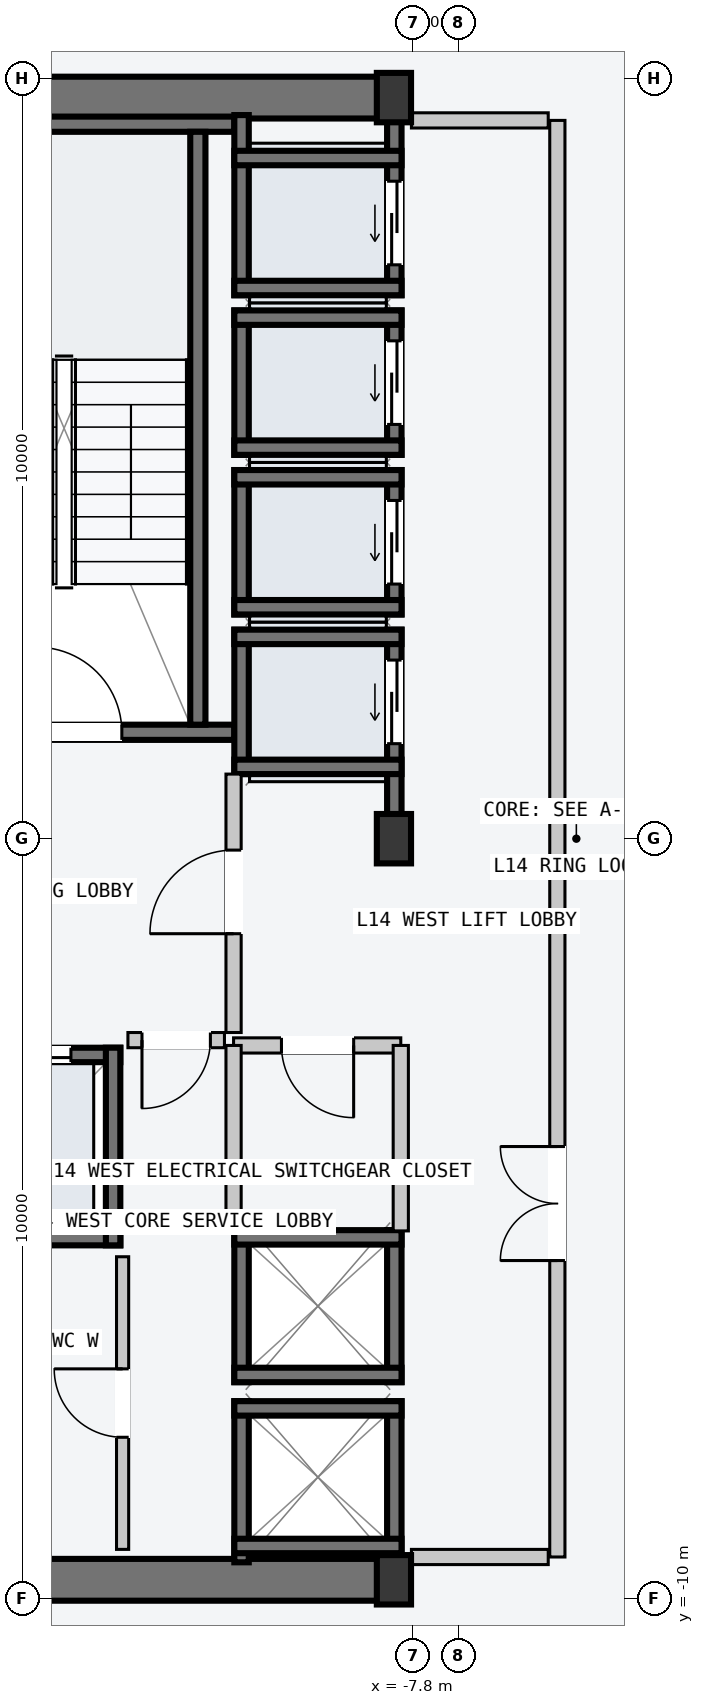
"""IFC4 building model, lengths in metres.
Left out: names, types, materials, properties, quantities, classifications, styles, units other than length and angle.
Written with IfcOpenShell. Run it as: python <this file> out.ifc"""

import sys

from ifc_helpers import new_model, si_unit, direction, frame, frame_2d, origin, origin_2d, place, context, subcontext, project, spatial, rectangle, i_section, extrude, element, fill, save


model = new_model("IFC4")
c1 = context("Model", 3, precision=1e-05, world=origin(), true_north=direction((0.0, 1.0)))
c2 = subcontext(c1, "Body", "Model", "MODEL_VIEW")
j1 = project(units=[si_unit("LENGTHUNIT", "METRE"), si_unit("PLANEANGLEUNIT", "RADIAN")], contexts=[c1])
p1 = place(None, origin())
s1 = spatial("IfcSite", under=j1, at=p1, CompositionType="ELEMENT")
p2 = place(p1, origin())
s2 = spatial("IfcBuilding", under=s1, at=p2, CompositionType="ELEMENT")
p3 = place(p2, frame((0.0, 0.0, 56.4)))
s3 = spatial("IfcBuildingStorey", under=s2, at=p3, CompositionType="ELEMENT", Elevation=56.4)
for number, where, z_axis, x_axis in (
    (1, (-14.53, -9.75, -0.2), (0.0, 0.0, 1.0), (1.0, 0.0, 0.0)),
    (2, (-14.53, 9.75, -0.2), (0.0, 0.0, 1.0), (1.0, 0.0, 0.0)),
):
    element("IfcWall", number, at=place(p3, frame(where, z_axis=z_axis, x_axis=x_axis)), inside=s3, PredefinedType="SHEAR", context=c2, shape_type="SweptSolid", body=[
        extrude(rectangle(XDim=6.46, YDim=0.55, at=frame_2d((3.23, 0.0))), origin(), (0.0, 0.0, 1.0), 3.6),
    ])
p4 = place(p3, frame((-14.25, 1.4, -0.2), z_axis=(0.0, 0.0, 1.0), x_axis=(1.0, 0.0, 0.0)))
e3 = element("IfcWall", 3, at=p4, inside=s3, PredefinedType="SOLIDWALL", context=c2, shape_type="SweptSolid", body=[
    extrude(rectangle(XDim=4.1, YDim=0.2, at=frame_2d((2.05, 0.0))), origin(), (0.0, 0.0, 1.0), 3.6),
])
p5 = place(p4, frame((1.5, 0.0, 0.2)))
e4 = element("IfcOpeningElement", 4, at=p5, cuts=e3, PredefinedType="OPENING", context=c2, shape_type="SweptSolid", body=[
    extrude(rectangle(XDim=1.12, YDim=2.18, at=frame_2d((0.56, 1.09))), frame((0.0, 0.11, 0.0), z_axis=(0.0, -1.0, 0.0), x_axis=(1.0, 0.0, 0.0)), (0.0, 0.0, 1.0), 0.22),
])
p6 = place(p3, frame((-14.25, 9.4, -0.2), z_axis=(0.0, 0.0, 1.0), x_axis=(1.0, 0.0, 0.0)))
e5 = element("IfcWall", 5, at=p6, inside=s3, PredefinedType="SOLIDWALL", context=c2, shape_type="SweptSolid", body=[
    extrude(rectangle(XDim=4.1, YDim=0.2, at=frame_2d((2.05, 0.0))), origin(), (0.0, 0.0, 1.0), 3.6),
])
p7 = place(p3, frame((-10.63, 1.5, -0.2), z_axis=(0.0, 0.0, 1.0), x_axis=(0.0, 1.0, 0.0)))
e6 = element("IfcWall", 6, at=p7, inside=s3, PredefinedType="SOLIDWALL", context=c2, shape_type="SweptSolid", body=[
    extrude(rectangle(XDim=7.8, YDim=0.2, at=frame_2d((3.9, 0.0))), origin(), (0.0, 0.0, 1.0), 3.6),
])
for number, where, z_axis, x_axis in (
    (7, (-8.05, -9.75, 0.0), (0.0, 0.0, 1.0), (1.0, 0.0, 0.0)),
    (8, (-8.05, 0.0, 0.0), (0.0, 0.0, 1.0), (1.0, 0.0, 0.0)),
    (9, (-8.05, 9.75, 0.0), (0.0, 0.0, 1.0), (1.0, 0.0, 0.0)),
):
    element("IfcColumn", number, at=place(p3, frame(where, z_axis=z_axis, x_axis=x_axis)), inside=s3, PredefinedType="COLUMN", context=c2, shape_type="SweptSolid", body=[
        extrude(i_section(OverallWidth=0.45, OverallDepth=0.65, WebThickness=0.025, FlangeThickness=0.04, at=origin_2d()), origin(), (0.0, 0.0, 1.0), 3.6),
    ])
p8 = place(p3, frame((-8.045, 0.21, -0.2), z_axis=(0.0, 0.0, 1.0), x_axis=(0.0, 1.0, 0.0)))
e10 = element("IfcWall", 10, at=p8, inside=s3, PredefinedType="SOLIDWALL", context=c2, shape_type="SweptSolid", body=[
    extrude(rectangle(XDim=2.54, YDim=0.19, at=frame_2d((1.27, 0.0))), origin(), (0.0, 0.0, 1.0), 3.6),
])
p9 = place(p8, frame((1.04, 0.0, 0.2)))
e11 = element("IfcOpeningElement", 11, at=p9, cuts=e10, PredefinedType="OPENING", context=c2, shape_type="SweptSolid", body=[
    extrude(rectangle(XDim=1.1, YDim=2.2, at=frame_2d((0.55, 1.1))), frame((0.0, 0.105, 0.0), z_axis=(0.0, -1.0, 0.0), x_axis=(1.0, 0.0, 0.0)), (0.0, 0.0, 1.0), 0.21),
])
p10 = place(p3, frame((-10.055, 0.85, -0.2), z_axis=(0.0, 0.0, 1.0), x_axis=(0.0, 1.0, 0.0)))
e12 = element("IfcWall", 12, at=p10, inside=s3, PredefinedType="SOLIDWALL", context=c2, shape_type="SweptSolid", body=[
    extrude(rectangle(XDim=1.9, YDim=0.19, at=frame_2d((0.95, 0.0))), origin(), (0.0, 0.0, 1.0), 3.6),
])
for number, where, z_axis, x_axis in (
    (13, (-10.15, 2.655, -0.2), (0.0, 0.0, 1.0), (1.0, 0.0, 0.0)),
    (14, (-10.15, 0.945, -0.2), (0.0, 0.0, 1.0), (1.0, 0.0, 0.0)),
):
    element("IfcWall", number, at=place(p3, frame(where, z_axis=z_axis, x_axis=x_axis)), inside=s3, PredefinedType="SOLIDWALL", context=c2, shape_type="SweptSolid", body=[
        extrude(rectangle(XDim=2.2, YDim=0.19, at=frame_2d((1.1, 0.0))), origin(), (0.0, 0.0, 1.0), 3.6),
    ])
p11 = place(p3, frame((-8.045, 2.95, -0.2), z_axis=(0.0, 0.0, 1.0), x_axis=(0.0, 1.0, 0.0)))
e15 = element("IfcWall", 15, at=p11, inside=s3, PredefinedType="SOLIDWALL", context=c2, shape_type="SweptSolid", body=[
    extrude(rectangle(XDim=1.9, YDim=0.19, at=frame_2d((0.95, 0.0))), origin(), (0.0, 0.0, 1.0), 3.6),
])
p12 = place(p11, frame((0.4, 0.0, 0.2)))
e16 = element("IfcOpeningElement", 16, at=p12, cuts=e15, PredefinedType="OPENING", context=c2, shape_type="SweptSolid", body=[
    extrude(rectangle(XDim=1.1, YDim=2.2, at=frame_2d((0.55, 1.1))), frame((0.0, 0.105, 0.0), z_axis=(0.0, -1.0, 0.0), x_axis=(1.0, 0.0, 0.0)), (0.0, 0.0, 1.0), 0.21),
])
p13 = place(p3, frame((-10.055, 2.95, -0.2), z_axis=(0.0, 0.0, 1.0), x_axis=(0.0, 1.0, 0.0)))
e17 = element("IfcWall", 17, at=p13, inside=s3, PredefinedType="SOLIDWALL", context=c2, shape_type="SweptSolid", body=[
    extrude(rectangle(XDim=1.9, YDim=0.19, at=frame_2d((0.95, 0.0))), origin(), (0.0, 0.0, 1.0), 3.6),
])
for number, where, z_axis, x_axis in (
    (18, (-10.15, 4.755, -0.2), (0.0, 0.0, 1.0), (1.0, 0.0, 0.0)),
    (19, (-10.15, 3.045, -0.2), (0.0, 0.0, 1.0), (1.0, 0.0, 0.0)),
):
    element("IfcWall", number, at=place(p3, frame(where, z_axis=z_axis, x_axis=x_axis)), inside=s3, PredefinedType="SOLIDWALL", context=c2, shape_type="SweptSolid", body=[
        extrude(rectangle(XDim=2.2, YDim=0.19, at=frame_2d((1.1, 0.0))), origin(), (0.0, 0.0, 1.0), 3.6),
    ])
p14 = place(p3, frame((-8.045, 5.05, -0.2), z_axis=(0.0, 0.0, 1.0), x_axis=(0.0, 1.0, 0.0)))
e20 = element("IfcWall", 20, at=p14, inside=s3, PredefinedType="SOLIDWALL", context=c2, shape_type="SweptSolid", body=[
    extrude(rectangle(XDim=1.9, YDim=0.19, at=frame_2d((0.95, 0.0))), origin(), (0.0, 0.0, 1.0), 3.6),
])
p15 = place(p14, frame((0.4, 0.0, 0.2)))
e21 = element("IfcOpeningElement", 21, at=p15, cuts=e20, PredefinedType="OPENING", context=c2, shape_type="SweptSolid", body=[
    extrude(rectangle(XDim=1.1, YDim=2.2, at=frame_2d((0.55, 1.1))), frame((0.0, 0.105, 0.0), z_axis=(0.0, -1.0, 0.0), x_axis=(1.0, 0.0, 0.0)), (0.0, 0.0, 1.0), 0.21),
])
p16 = place(p3, frame((-10.055, 5.05, -0.2), z_axis=(0.0, 0.0, 1.0), x_axis=(0.0, 1.0, 0.0)))
e22 = element("IfcWall", 22, at=p16, inside=s3, PredefinedType="SOLIDWALL", context=c2, shape_type="SweptSolid", body=[
    extrude(rectangle(XDim=1.9, YDim=0.19, at=frame_2d((0.95, 0.0))), origin(), (0.0, 0.0, 1.0), 3.6),
])
for number, where, z_axis, x_axis in (
    (23, (-10.15, 6.855, -0.2), (0.0, 0.0, 1.0), (1.0, 0.0, 0.0)),
    (24, (-10.15, 5.145, -0.2), (0.0, 0.0, 1.0), (1.0, 0.0, 0.0)),
):
    element("IfcWall", number, at=place(p3, frame(where, z_axis=z_axis, x_axis=x_axis)), inside=s3, PredefinedType="SOLIDWALL", context=c2, shape_type="SweptSolid", body=[
        extrude(rectangle(XDim=2.2, YDim=0.19, at=frame_2d((1.1, 0.0))), origin(), (0.0, 0.0, 1.0), 3.6),
    ])
p17 = place(p3, frame((-8.045, 7.15, -0.2), z_axis=(0.0, 0.0, 1.0), x_axis=(0.0, 1.0, 0.0)))
e25 = element("IfcWall", 25, at=p17, inside=s3, PredefinedType="SOLIDWALL", context=c2, shape_type="SweptSolid", body=[
    extrude(rectangle(XDim=2.37, YDim=0.19, at=frame_2d((1.185, 0.0))), origin(), (0.0, 0.0, 1.0), 3.6),
])
p18 = place(p17, frame((0.4, 0.0, 0.2)))
e26 = element("IfcOpeningElement", 26, at=p18, cuts=e25, PredefinedType="OPENING", context=c2, shape_type="SweptSolid", body=[
    extrude(rectangle(XDim=1.1, YDim=2.2, at=frame_2d((0.55, 1.1))), frame((0.0, 0.105, 0.0), z_axis=(0.0, -1.0, 0.0), x_axis=(1.0, 0.0, 0.0)), (0.0, 0.0, 1.0), 0.21),
])
p19 = place(p3, frame((-10.055, 7.15, -0.2), z_axis=(0.0, 0.0, 1.0), x_axis=(0.0, 1.0, 0.0)))
e27 = element("IfcWall", 27, at=p19, inside=s3, PredefinedType="SOLIDWALL", context=c2, shape_type="SweptSolid", body=[
    extrude(rectangle(XDim=2.37, YDim=0.19, at=frame_2d((1.185, 0.0))), origin(), (0.0, 0.0, 1.0), 3.6),
])
for number, where, z_axis, x_axis in (
    (28, (-10.15, 8.955, -0.2), (0.0, 0.0, 1.0), (1.0, 0.0, 0.0)),
    (29, (-10.15, 7.245, -0.2), (0.0, 0.0, 1.0), (1.0, 0.0, 0.0)),
):
    element("IfcWall", number, at=place(p3, frame(where, z_axis=z_axis, x_axis=x_axis)), inside=s3, PredefinedType="SOLIDWALL", context=c2, shape_type="SweptSolid", body=[
        extrude(rectangle(XDim=2.2, YDim=0.19, at=frame_2d((1.1, 0.0))), origin(), (0.0, 0.0, 1.0), 3.6),
    ])
for number, where, z_axis, x_axis in (
    (30, (-8.045, -9.52, -0.2), (0.0, 0.0, 1.0), (0.0, 1.0, 0.0)),
    (31, (-10.055, -9.52, -0.2), (0.0, 0.0, 1.0), (0.0, 1.0, 0.0)),
):
    element("IfcWall", number, at=place(p3, frame(where, z_axis=z_axis, x_axis=x_axis)), inside=s3, PredefinedType="SOLIDWALL", context=c2, shape_type="SweptSolid", body=[
        extrude(rectangle(XDim=2.12, YDim=0.19, at=frame_2d((1.06, 0.0))), origin(), (0.0, 0.0, 1.0), 3.6),
    ])
for number, where, z_axis, x_axis in (
    (32, (-10.15, -7.495, -0.2), (0.0, 0.0, 1.0), (1.0, 0.0, 0.0)),
    (33, (-10.15, -9.305, -0.2), (0.0, 0.0, 1.0), (1.0, 0.0, 0.0)),
):
    element("IfcWall", number, at=place(p3, frame(where, z_axis=z_axis, x_axis=x_axis)), inside=s3, PredefinedType="SOLIDWALL", context=c2, shape_type="SweptSolid", body=[
        extrude(rectangle(XDim=2.2, YDim=0.19, at=frame_2d((1.1, 0.0))), origin(), (0.0, 0.0, 1.0), 3.6),
    ])
for number, where, z_axis, x_axis in (
    (34, (-8.045, -7.15, -0.2), (0.0, 0.0, 1.0), (0.0, 1.0, 0.0)),
    (35, (-10.055, -7.15, -0.2), (0.0, 0.0, 1.0), (0.0, 1.0, 0.0)),
):
    element("IfcWall", number, at=place(p3, frame(where, z_axis=z_axis, x_axis=x_axis)), inside=s3, PredefinedType="SOLIDWALL", context=c2, shape_type="SweptSolid", body=[
        extrude(rectangle(XDim=2.0, YDim=0.19, at=frame_2d((1.0, 0.0))), origin(), (0.0, 0.0, 1.0), 3.6),
    ])
for number, where, z_axis, x_axis in (
    (36, (-10.15, -5.245, -0.2), (0.0, 0.0, 1.0), (1.0, 0.0, 0.0)),
    (37, (-10.15, -7.055, -0.2), (0.0, 0.0, 1.0), (1.0, 0.0, 0.0)),
):
    element("IfcWall", number, at=place(p3, frame(where, z_axis=z_axis, x_axis=x_axis)), inside=s3, PredefinedType="SOLIDWALL", context=c2, shape_type="SweptSolid", body=[
        extrude(rectangle(XDim=2.2, YDim=0.19, at=frame_2d((1.1, 0.0))), origin(), (0.0, 0.0, 1.0), 3.6),
    ])
p20 = place(p3, frame((-14.33, -2.845, -0.2), z_axis=(0.0, 0.0, 1.0), x_axis=(1.0, 0.0, 0.0)))
e38 = element("IfcWall", 38, at=p20, inside=s3, PredefinedType="SOLIDWALL", context=c2, shape_type="SweptSolid", body=[
    extrude(rectangle(XDim=2.68, YDim=0.19, at=frame_2d((1.34, 0.0))), origin(), (0.0, 0.0, 1.0), 3.6),
])
p21 = place(p20, frame((0.83, 0.0, 0.2)))
e39 = element("IfcOpeningElement", 39, at=p21, cuts=e38, PredefinedType="OPENING", context=c2, shape_type="SweptSolid", body=[
    extrude(rectangle(XDim=1.2, YDim=2.2, at=frame_2d((0.6, 1.1))), frame((0.0, 0.105, 0.0), z_axis=(0.0, -1.0, 0.0), x_axis=(1.0, 0.0, 0.0)), (0.0, 0.0, 1.0), 0.21),
])
p22 = place(p3, frame((-14.33, -5.255, -0.2), z_axis=(0.0, 0.0, 1.0), x_axis=(1.0, 0.0, 0.0)))
e40 = element("IfcWall", 40, at=p22, inside=s3, PredefinedType="SOLIDWALL", context=c2, shape_type="SweptSolid", body=[
    extrude(rectangle(XDim=2.68, YDim=0.19, at=frame_2d((1.34, 0.0))), origin(), (0.0, 0.0, 1.0), 3.6),
])
p23 = place(p3, frame((-11.745, -5.35, -0.2), z_axis=(0.0, 0.0, 1.0), x_axis=(0.0, 1.0, 0.0)))
e41 = element("IfcWall", 41, at=p23, inside=s3, PredefinedType="SOLIDWALL", context=c2, shape_type="SweptSolid", body=[
    extrude(rectangle(XDim=2.6, YDim=0.19, at=frame_2d((1.3, 0.0))), origin(), (0.0, 0.0, 1.0), 3.6),
])
p24 = place(p3, frame((-5.9, -9.45, 0.0), z_axis=(0.0, 0.0, 1.0), x_axis=(0.0, 1.0, 0.0)))
e42 = element("IfcWall", 42, at=p24, inside=s3, PredefinedType="PARTITIONING", context=c2, shape_type="SweptSolid", body=[
    extrude(rectangle(XDim=18.9, YDim=0.2, at=frame_2d((9.45, 0.0))), origin(), (0.0, 0.0, 1.0), 3.4),
])
p25 = place(p24, frame((3.9, 0.0, 0.0)))
e43 = element("IfcOpeningElement", 43, at=p25, cuts=e42, PredefinedType="OPENING", context=c2, shape_type="SweptSolid", body=[
    extrude(rectangle(XDim=1.5, YDim=2.2, at=frame_2d((0.75, 1.1))), frame((0.0, 0.11, 0.0), z_axis=(0.0, -1.0, 0.0), x_axis=(1.0, 0.0, 0.0)), (0.0, 0.0, 1.0), 0.22),
])
for number, where, z_axis, x_axis in (
    (44, (-6.02, -9.45, 0.0), (0.0, 0.0, 1.0), (-1.0, 0.0, 0.0)),
    (45, (-6.02, 9.45, 0.0), (0.0, 0.0, 1.0), (-1.0, 0.0, 0.0)),
):
    element("IfcWall", number, at=place(p3, frame(where, z_axis=z_axis, x_axis=x_axis)), inside=s3, PredefinedType="PARTITIONING", context=c2, shape_type="SweptSolid", body=[
        extrude(rectangle(XDim=1.8, YDim=0.2, at=frame_2d((0.9, 0.0))), origin(), (0.0, 0.0, 1.0), 3.4),
    ])
p26 = place(p3, frame((-10.16, -2.55, 0.0), z_axis=(0.0, 0.0, 1.0), x_axis=(0.0, 1.0, 0.0)))
e46 = element("IfcWall", 46, at=p26, inside=s3, PredefinedType="PARTITIONING", context=c2, shape_type="SweptSolid", body=[
    extrude(rectangle(XDim=3.4, YDim=0.2, at=frame_2d((1.7, 0.0))), origin(), (0.0, 0.0, 1.0), 3.4),
])
p27 = place(p26, frame((1.3, 0.0, 0.0)))
e47 = element("IfcOpeningElement", 47, at=p27, cuts=e46, PredefinedType="OPENING", context=c2, shape_type="SweptSolid", body=[
    extrude(rectangle(XDim=1.1, YDim=2.15, at=frame_2d((0.55, 1.075))), frame((0.0, 0.11, 0.0), z_axis=(0.0, -1.0, 0.0), x_axis=(1.0, 0.0, 0.0)), (0.0, 0.0, 1.0), 0.22),
])
p28 = place(p3, frame((-10.28, -2.65, 0.0), z_axis=(0.0, 0.0, 1.0), x_axis=(-1.0, 0.0, 0.0)))
e48 = element("IfcWall", 48, at=p28, inside=s3, PredefinedType="PARTITIONING", context=c2, shape_type="SweptSolid", body=[
    extrude(rectangle(XDim=1.27, YDim=0.2, at=frame_2d((0.635, 0.0))), origin(), (0.0, 0.0, 1.0), 3.4),
])
p29 = place(p28, frame((0.185, 0.0, 0.0)))
e49 = element("IfcOpeningElement", 49, at=p29, cuts=e48, PredefinedType="OPENING", context=c2, shape_type="SweptSolid", body=[
    extrude(rectangle(XDim=0.9, YDim=2.15, at=frame_2d((0.45, 1.075))), frame((0.0, 0.11, 0.0), z_axis=(0.0, -1.0, 0.0), x_axis=(1.0, 0.0, 0.0)), (0.0, 0.0, 1.0), 0.22),
])
p30 = place(p3, frame((-7.96, -2.72, 0.0), z_axis=(0.0, 0.0, 1.0), x_axis=(-1.0, 0.0, 0.0)))
e50 = element("IfcWall", 50, at=p30, inside=s3, PredefinedType="PARTITIONING", context=c2, shape_type="SweptSolid", body=[
    extrude(rectangle(XDim=2.2, YDim=0.2, at=frame_2d((1.1, 0.0))), origin(), (0.0, 0.0, 1.0), 3.4),
])
p31 = place(p30, frame((0.62, 0.0, 0.0)))
e51 = element("IfcOpeningElement", 51, at=p31, cuts=e50, PredefinedType="OPENING", context=c2, shape_type="SweptSolid", body=[
    extrude(rectangle(XDim=0.95, YDim=2.1, at=frame_2d((0.475, 1.05))), frame((0.0, 0.11, 0.0), z_axis=(0.0, -1.0, 0.0), x_axis=(1.0, 0.0, 0.0)), (0.0, 0.0, 1.0), 0.22),
])
for number, where, z_axis, x_axis in (
    (52, (-7.96, -5.16, 0.0), (0.0, 0.0, 1.0), (0.0, 1.0, 0.0)),
    (53, (-10.16, -5.16, 0.0), (0.0, 0.0, 1.0), (0.0, 1.0, 0.0)),
):
    element("IfcWall", number, at=place(p3, frame(where, z_axis=z_axis, x_axis=x_axis)), inside=s3, PredefinedType="PARTITIONING", context=c2, shape_type="SweptSolid", body=[
        extrude(rectangle(XDim=2.44, YDim=0.2, at=frame_2d((1.22, 0.0))), origin(), (0.0, 0.0, 1.0), 3.4),
    ])
p32 = place(p3, frame((-11.62, -9.35, 0.0), z_axis=(0.0, 0.0, 1.0), x_axis=(0.0, 1.0, 0.0)))
e54 = element("IfcWall", 54, at=p32, inside=s3, PredefinedType="PARTITIONING", context=c2, shape_type="SweptSolid", body=[
    extrude(rectangle(XDim=3.85, YDim=0.16, at=frame_2d((1.925, 0.0))), origin(), (0.0, 0.0, 1.0), 3.4),
])
p33 = place(p32, frame((1.475, 0.0, 0.0)))
e55 = element("IfcOpeningElement", 55, at=p33, cuts=e54, PredefinedType="OPENING", context=c2, shape_type="SweptSolid", body=[
    extrude(rectangle(XDim=0.9, YDim=2.15, at=frame_2d((0.45, 1.075))), frame((0.0, 0.09, 0.0), z_axis=(0.0, -1.0, 0.0), x_axis=(1.0, 0.0, 0.0)), (0.0, 0.0, 1.0), 0.18),
])
p34 = place(p5, origin())
e56 = element("IfcDoor", 56, at=p34, inside=s3, OperationType="SINGLE_SWING_LEFT", PredefinedType="DOOR", context=c2, shape_type="SweptSolid", body=[
    extrude(rectangle(XDim=1.12, YDim=2.18, at=frame_2d((0.56, 1.09))), frame((0.0, 0.025, 0.0), z_axis=(0.0, -1.0, 0.0), x_axis=(1.0, 0.0, 0.0)), (0.0, 0.0, 1.0), 0.05),
])
fill(e4, e56)
p35 = place(p9, origin())
e57 = element("IfcDoor", 57, at=p35, inside=s3, OperationType="SLIDING_TO_LEFT", PredefinedType="DOOR", context=c2, shape_type="SweptSolid", body=[
    extrude(rectangle(XDim=1.1, YDim=2.2, at=frame_2d((0.55, 1.1))), frame((0.0, 0.025, 0.0), z_axis=(0.0, -1.0, 0.0), x_axis=(1.0, 0.0, 0.0)), (0.0, 0.0, 1.0), 0.05),
])
fill(e11, e57)
p36 = place(p12, origin())
e58 = element("IfcDoor", 58, at=p36, inside=s3, OperationType="SLIDING_TO_LEFT", PredefinedType="DOOR", context=c2, shape_type="SweptSolid", body=[
    extrude(rectangle(XDim=1.1, YDim=2.2, at=frame_2d((0.55, 1.1))), frame((0.0, 0.025, 0.0), z_axis=(0.0, -1.0, 0.0), x_axis=(1.0, 0.0, 0.0)), (0.0, 0.0, 1.0), 0.05),
])
fill(e16, e58)
p37 = place(p15, origin())
e59 = element("IfcDoor", 59, at=p37, inside=s3, OperationType="SLIDING_TO_LEFT", PredefinedType="DOOR", context=c2, shape_type="SweptSolid", body=[
    extrude(rectangle(XDim=1.1, YDim=2.2, at=frame_2d((0.55, 1.1))), frame((0.0, 0.025, 0.0), z_axis=(0.0, -1.0, 0.0), x_axis=(1.0, 0.0, 0.0)), (0.0, 0.0, 1.0), 0.05),
])
fill(e21, e59)
p38 = place(p18, origin())
e60 = element("IfcDoor", 60, at=p38, inside=s3, OperationType="SLIDING_TO_LEFT", PredefinedType="DOOR", context=c2, shape_type="SweptSolid", body=[
    extrude(rectangle(XDim=1.1, YDim=2.2, at=frame_2d((0.55, 1.1))), frame((0.0, 0.025, 0.0), z_axis=(0.0, -1.0, 0.0), x_axis=(1.0, 0.0, 0.0)), (0.0, 0.0, 1.0), 0.05),
])
fill(e26, e60)
p39 = place(p21, origin())
e61 = element("IfcDoor", 61, at=p39, inside=s3, OperationType="SLIDING_TO_LEFT", PredefinedType="DOOR", context=c2, shape_type="SweptSolid", body=[
    extrude(rectangle(XDim=1.2, YDim=2.2, at=frame_2d((0.6, 1.1))), frame((0.0, 0.025, 0.0), z_axis=(0.0, -1.0, 0.0), x_axis=(1.0, 0.0, 0.0)), (0.0, 0.0, 1.0), 0.05),
])
fill(e39, e61)
p40 = place(p25, origin())
e62 = element("IfcDoor", 62, at=p40, inside=s3, OperationType="DOUBLE_DOOR_SINGLE_SWING", PredefinedType="DOOR", context=c2, shape_type="SweptSolid", body=[
    extrude(rectangle(XDim=1.5, YDim=2.2, at=frame_2d((0.75, 1.1))), frame((0.0, 0.025, 0.0), z_axis=(0.0, -1.0, 0.0), x_axis=(1.0, 0.0, 0.0)), (0.0, 0.0, 1.0), 0.05),
])
fill(e43, e62)
p41 = place(p27, origin())
e63 = element("IfcDoor", 63, at=p41, inside=s3, OperationType="SINGLE_SWING_LEFT", PredefinedType="DOOR", context=c2, shape_type="SweptSolid", body=[
    extrude(rectangle(XDim=1.1, YDim=2.15, at=frame_2d((0.55, 1.075))), frame((0.0, 0.025, 0.0), z_axis=(0.0, -1.0, 0.0), x_axis=(1.0, 0.0, 0.0)), (0.0, 0.0, 1.0), 0.05),
])
fill(e47, e63)
p42 = place(p29, origin())
e64 = element("IfcDoor", 64, at=p42, inside=s3, OperationType="SINGLE_SWING_RIGHT", PredefinedType="DOOR", context=c2, shape_type="SweptSolid", body=[
    extrude(rectangle(XDim=0.9, YDim=2.15, at=frame_2d((0.45, 1.075))), frame((0.0, 0.025, 0.0), z_axis=(0.0, -1.0, 0.0), x_axis=(1.0, 0.0, 0.0)), (0.0, 0.0, 1.0), 0.05),
])
fill(e49, e64)
p43 = place(p31, origin())
e65 = element("IfcDoor", 65, at=p43, inside=s3, OperationType="SINGLE_SWING_LEFT", PredefinedType="DOOR", context=c2, shape_type="SweptSolid", body=[
    extrude(rectangle(XDim=0.95, YDim=2.1, at=frame_2d((0.475, 1.05))), frame((0.0, 0.025, 0.0), z_axis=(0.0, -1.0, 0.0), x_axis=(1.0, 0.0, 0.0)), (0.0, 0.0, 1.0), 0.05),
])
fill(e51, e65)
p44 = place(p33, origin())
e66 = element("IfcDoor", 66, at=p44, inside=s3, OperationType="SINGLE_SWING_RIGHT", PredefinedType="DOOR", context=c2, shape_type="SweptSolid", body=[
    extrude(rectangle(XDim=0.9, YDim=2.15, at=frame_2d((0.45, 1.075))), frame((0.0, 0.025, 0.0), z_axis=(0.0, -1.0, 0.0), x_axis=(1.0, 0.0, 0.0)), (0.0, 0.0, 1.0), 0.05),
])
fill(e55, e66)
save(model, sys.argv[1])
